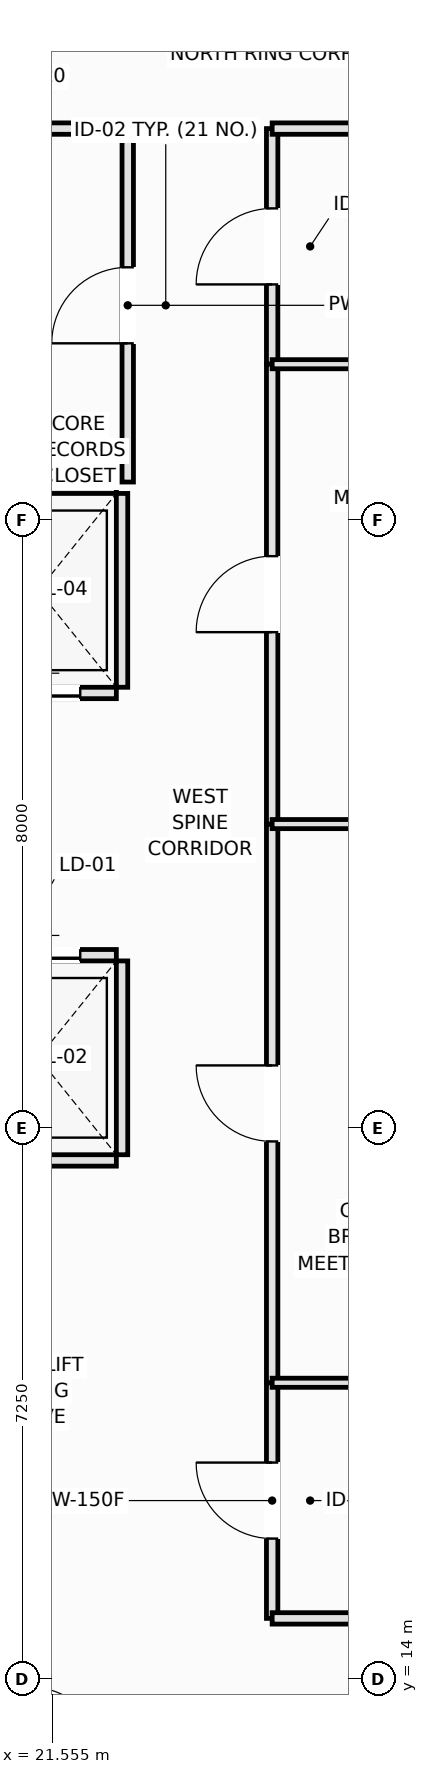
"""IFC4 building model, lengths in metres.
Left out: names, types, materials, properties, quantities, classifications, styles, units other than length and angle.
Written with IfcOpenShell. Run it as: python <this file> out.ifc"""

import sys

from ifc_helpers import new_model, si_unit, direction, frame, frame_2d, origin, place, context, subcontext, project, spatial, rectangle, extrude, element, fill, save


model = new_model("IFC4")
c1 = context("Model", 3, precision=1e-05, world=origin(), true_north=direction((0.0, 1.0)))
c2 = subcontext(c1, "Body", "Model", "MODEL_VIEW")
j1 = project(units=[si_unit("LENGTHUNIT", "METRE"), si_unit("PLANEANGLEUNIT", "RADIAN")], contexts=[c1])
p1 = place(None, origin())
s1 = spatial("IfcSite", under=j1, at=p1, CompositionType="ELEMENT")
p2 = place(p1, origin())
s2 = spatial("IfcBuilding", under=s1, at=p2, CompositionType="ELEMENT")
p3 = place(p2, frame((0.0, 0.0, 78.85)))
s3 = spatial("IfcBuildingStorey", under=s2, at=p3, CompositionType="ELEMENT", Elevation=78.85)
p4 = place(p3, frame((20.35, 20.825, 0.0), z_axis=(0.0, 0.0, 1.0), x_axis=(1.0, 0.0, 0.0)))
e1 = element("IfcWall", 1, at=p4, inside=s3, PredefinedType="PARTITIONING", context=c2, shape_type="SweptSolid", body=[
    extrude(rectangle(XDim=2.05, YDim=0.15, at=frame_2d((1.025, 0.0))), origin(), (0.0, 0.0, 1.0), 3.37),
])
p5 = place(p3, frame((20.35, 23.525, 0.0), z_axis=(0.0, 0.0, 1.0), x_axis=(1.0, 0.0, 0.0)))
e2 = element("IfcWall", 2, at=p5, inside=s3, PredefinedType="PARTITIONING", context=c2, shape_type="SweptSolid", body=[
    extrude(rectangle(XDim=2.05, YDim=0.15, at=frame_2d((1.025, 0.0))), origin(), (0.0, 0.0, 1.0), 3.37),
])
p6 = place(p5, frame((0.475, 0.0, 0.0)))
e3 = element("IfcOpeningElement", 3, at=p6, cuts=e2, PredefinedType="OPENING", context=c2, shape_type="SweptSolid", body=[
    extrude(rectangle(XDim=1.1, YDim=2.2, at=frame_2d((0.55, 1.1))), frame((0.0, 0.085, 0.0), z_axis=(0.0, -1.0, 0.0), x_axis=(1.0, 0.0, 0.0)), (0.0, 0.0, 1.0), 0.17),
])
p7 = place(p3, frame((22.475, 20.9, 0.0), z_axis=(0.0, 0.0, 1.0), x_axis=(0.0, 1.0, 0.0)))
e4 = element("IfcWall", 4, at=p7, inside=s3, PredefinedType="PARTITIONING", context=c2, shape_type="SweptSolid", body=[
    extrude(rectangle(XDim=2.55, YDim=0.15, at=frame_2d((1.275, 0.0))), origin(), (0.0, 0.0, 1.0), 3.37),
])
p8 = place(p3, frame((20.35, 26.975, 0.0), z_axis=(0.0, 0.0, 1.0), x_axis=(1.0, 0.0, 0.0)))
e5 = element("IfcWall", 5, at=p8, inside=s3, PredefinedType="PARTITIONING", context=c2, shape_type="SweptSolid", body=[
    extrude(rectangle(XDim=2.05, YDim=0.15, at=frame_2d((1.025, 0.0))), origin(), (0.0, 0.0, 1.0), 3.37),
])
p9 = place(p8, frame((0.475, 0.0, 0.0)))
e6 = element("IfcOpeningElement", 6, at=p9, cuts=e5, PredefinedType="OPENING", context=c2, shape_type="SweptSolid", body=[
    extrude(rectangle(XDim=1.1, YDim=2.2, at=frame_2d((0.55, 1.1))), frame((0.0, 0.085, 0.0), z_axis=(0.0, -1.0, 0.0), x_axis=(1.0, 0.0, 0.0)), (0.0, 0.0, 1.0), 0.17),
])
p10 = place(p3, frame((20.35, 29.675, 0.0), z_axis=(0.0, 0.0, 1.0), x_axis=(1.0, 0.0, 0.0)))
e7 = element("IfcWall", 7, at=p10, inside=s3, PredefinedType="PARTITIONING", context=c2, shape_type="SweptSolid", body=[
    extrude(rectangle(XDim=2.05, YDim=0.15, at=frame_2d((1.025, 0.0))), origin(), (0.0, 0.0, 1.0), 3.37),
])
p11 = place(p3, frame((22.475, 27.05, 0.0), z_axis=(0.0, 0.0, 1.0), x_axis=(0.0, 1.0, 0.0)))
e8 = element("IfcWall", 8, at=p11, inside=s3, PredefinedType="PARTITIONING", context=c2, shape_type="SweptSolid", body=[
    extrude(rectangle(XDim=2.55, YDim=0.15, at=frame_2d((1.275, 0.0))), origin(), (0.0, 0.0, 1.0), 3.37),
])
p12 = place(p3, frame((22.55, 29.75, 0.0), z_axis=(0.0, 0.0, 1.0), x_axis=(0.0, 1.0, 0.0)))
e9 = element("IfcWall", 9, at=p12, inside=s3, PredefinedType="PARTITIONING", context=c2, shape_type="SweptSolid", body=[
    extrude(rectangle(XDim=4.65, YDim=0.15, at=frame_2d((2.325, 0.0))), origin(), (0.0, 0.0, 1.0), 3.01),
])
p13 = place(p12, frame((1.825, 0.0, 0.0)))
e10 = element("IfcOpeningElement", 10, at=p13, cuts=e9, PredefinedType="OPENING", context=c2, shape_type="SweptSolid", body=[
    extrude(rectangle(XDim=1.0, YDim=2.15, at=frame_2d((0.5, 1.075))), frame((0.0, 0.085, 0.0), z_axis=(0.0, -1.0, 0.0), x_axis=(1.0, 0.0, 0.0)), (0.0, 0.0, 1.0), 0.17),
])
p14 = place(p3, frame((24.45, 14.8, 0.0), z_axis=(0.0, 0.0, 1.0), x_axis=(0.0, 1.0, 0.0)))
e11 = element("IfcWall", 11, at=p14, inside=s3, PredefinedType="PARTITIONING", context=c2, shape_type="SweptSolid", body=[
    extrude(rectangle(XDim=3.1, YDim=0.15, at=frame_2d((1.55, 0.0))), origin(), (0.0, 0.0, 1.0), 3.37),
])
p15 = place(p14, frame((1.05, 0.0, 0.0)))
e12 = element("IfcOpeningElement", 12, at=p15, cuts=e11, PredefinedType="OPENING", context=c2, shape_type="SweptSolid", body=[
    extrude(rectangle(XDim=1.0, YDim=2.15, at=frame_2d((0.5, 1.075))), frame((0.0, 0.085, 0.0), z_axis=(0.0, -1.0, 0.0), x_axis=(1.0, 0.0, 0.0)), (0.0, 0.0, 1.0), 0.17),
])
p16 = place(p3, frame((24.45, 31.3, 0.0), z_axis=(0.0, 0.0, 1.0), x_axis=(0.0, 1.0, 0.0)))
e13 = element("IfcWall", 13, at=p16, inside=s3, PredefinedType="PARTITIONING", context=c2, shape_type="SweptSolid", body=[
    extrude(rectangle(XDim=3.1, YDim=0.15, at=frame_2d((1.55, 0.0))), origin(), (0.0, 0.0, 1.0), 3.37),
])
p17 = place(p16, frame((1.05, 0.0, 0.0)))
e14 = element("IfcOpeningElement", 14, at=p17, cuts=e13, PredefinedType="OPENING", context=c2, shape_type="SweptSolid", body=[
    extrude(rectangle(XDim=1.0, YDim=2.15, at=frame_2d((0.5, 1.075))), frame((0.0, 0.085, 0.0), z_axis=(0.0, -1.0, 0.0), x_axis=(1.0, 0.0, 0.0)), (0.0, 0.0, 1.0), 0.17),
])
p18 = place(p3, frame((24.45, 17.9, 0.0), z_axis=(0.0, 0.0, 1.0), x_axis=(0.0, 1.0, 0.0)))
e15 = element("IfcWall", 15, at=p18, inside=s3, PredefinedType="PARTITIONING", context=c2, shape_type="SweptSolid", body=[
    extrude(rectangle(XDim=7.35, YDim=0.15, at=frame_2d((3.675, 0.0))), origin(), (0.0, 0.0, 1.0), 3.37),
])
p19 = place(p18, frame((3.175, 0.0, 0.0)))
e16 = element("IfcOpeningElement", 16, at=p19, cuts=e15, PredefinedType="OPENING", context=c2, shape_type="SweptSolid", body=[
    extrude(rectangle(XDim=1.0, YDim=2.15, at=frame_2d((0.5, 1.075))), frame((0.0, 0.085, 0.0), z_axis=(0.0, -1.0, 0.0), x_axis=(1.0, 0.0, 0.0)), (0.0, 0.0, 1.0), 0.17),
])
p20 = place(p3, frame((24.45, 25.25, 0.0), z_axis=(0.0, 0.0, 1.0), x_axis=(0.0, 1.0, 0.0)))
e17 = element("IfcWall", 17, at=p20, inside=s3, PredefinedType="PARTITIONING", context=c2, shape_type="SweptSolid", body=[
    extrude(rectangle(XDim=6.05, YDim=0.15, at=frame_2d((3.025, 0.0))), origin(), (0.0, 0.0, 1.0), 3.37),
])
p21 = place(p20, frame((2.525, 0.0, 0.0)))
e18 = element("IfcOpeningElement", 18, at=p21, cuts=e17, PredefinedType="OPENING", context=c2, shape_type="SweptSolid", body=[
    extrude(rectangle(XDim=1.0, YDim=2.15, at=frame_2d((0.5, 1.075))), frame((0.0, 0.085, 0.0), z_axis=(0.0, -1.0, 0.0), x_axis=(1.0, 0.0, 0.0)), (0.0, 0.0, 1.0), 0.17),
])
p22 = place(p3, frame((24.45, 14.8, 0.0), z_axis=(0.0, 0.0, 1.0), x_axis=(1.0, 0.0, 0.0)))
e19 = element("IfcWall", 19, at=p22, inside=s3, PredefinedType="PARTITIONING", context=c2, shape_type="SweptSolid", body=[
    extrude(rectangle(XDim=6.35, YDim=0.15, at=frame_2d((3.175, 0.0))), origin(), (0.0, 0.0, 1.0), 3.37),
])
p23 = place(p3, frame((21.25, 34.4, 0.0), z_axis=(0.0, 0.0, 1.0), x_axis=(1.0, 0.0, 0.0)))
e20 = element("IfcWall", 20, at=p23, inside=s3, PredefinedType="PARTITIONING", context=c2, shape_type="SweptSolid", body=[
    extrude(rectangle(XDim=1.3, YDim=0.15, at=frame_2d((0.65, 0.0))), origin(), (0.0, 0.0, 1.0), 3.37),
])
p24 = place(p3, frame((24.45, 34.4, 0.0), z_axis=(0.0, 0.0, 1.0), x_axis=(1.0, 0.0, 0.0)))
e21 = element("IfcWall", 21, at=p24, inside=s3, PredefinedType="PARTITIONING", context=c2, shape_type="SweptSolid", body=[
    extrude(rectangle(XDim=6.35, YDim=0.15, at=frame_2d((3.175, 0.0))), origin(), (0.0, 0.0, 1.0), 3.37),
])
for number, where, z_axis, x_axis in (
    (22, (24.45, 17.9, 0.0), (0.0, 0.0, 1.0), (1.0, 0.0, 0.0)),
    (23, (24.45, 31.3, 0.0), (0.0, 0.0, 1.0), (1.0, 0.0, 0.0)),
):
    element("IfcWall", number, at=place(p3, frame(where, z_axis=z_axis, x_axis=x_axis)), inside=s3, PredefinedType="PARTITIONING", context=c2, shape_type="SweptSolid", body=[
        extrude(rectangle(XDim=3.05, YDim=0.12, at=frame_2d((1.525, 0.0))), origin(), (0.0, 0.0, 1.0), 3.37),
    ])
p25 = place(p3, frame((24.45, 25.25, 0.0), z_axis=(0.0, 0.0, 1.0), x_axis=(1.0, 0.0, 0.0)))
e24 = element("IfcWall", 24, at=p25, inside=s3, PredefinedType="PARTITIONING", context=c2, shape_type="SweptSolid", body=[
    extrude(rectangle(XDim=3.05, YDim=0.12, at=frame_2d((1.525, 0.0))), origin(), (0.0, 0.0, 1.0), 2.72),
])
p26 = place(p6, origin())
e25 = element("IfcDoor", 25, at=p26, inside=s3, OperationType="DOUBLE_DOOR_SLIDING", PredefinedType="DOOR", context=c2, shape_type="SweptSolid", body=[
    extrude(rectangle(XDim=1.1, YDim=2.2, at=frame_2d((0.55, 1.1))), frame((0.0, 0.025, 0.0), z_axis=(0.0, -1.0, 0.0), x_axis=(1.0, 0.0, 0.0)), (0.0, 0.0, 1.0), 0.05),
])
fill(e3, e25)
p27 = place(p9, origin())
e26 = element("IfcDoor", 26, at=p27, inside=s3, OperationType="DOUBLE_DOOR_SLIDING", PredefinedType="DOOR", context=c2, shape_type="SweptSolid", body=[
    extrude(rectangle(XDim=1.1, YDim=2.2, at=frame_2d((0.55, 1.1))), frame((0.0, 0.025, 0.0), z_axis=(0.0, -1.0, 0.0), x_axis=(1.0, 0.0, 0.0)), (0.0, 0.0, 1.0), 0.05),
])
fill(e6, e26)
p28 = place(p13, origin())
e27 = element("IfcDoor", 27, at=p28, inside=s3, OperationType="SINGLE_SWING_LEFT", PredefinedType="DOOR", context=c2, shape_type="SweptSolid", body=[
    extrude(rectangle(XDim=1.0, YDim=2.15, at=frame_2d((0.5, 1.075))), frame((0.0, 0.025, 0.0), z_axis=(0.0, -1.0, 0.0), x_axis=(1.0, 0.0, 0.0)), (0.0, 0.0, 1.0), 0.05),
])
fill(e10, e27)
p29 = place(p15, origin())
e28 = element("IfcDoor", 28, at=p29, inside=s3, OperationType="SINGLE_SWING_RIGHT", PredefinedType="DOOR", context=c2, shape_type="SweptSolid", body=[
    extrude(rectangle(XDim=1.0, YDim=2.15, at=frame_2d((0.5, 1.075))), frame((0.0, 0.025, 0.0), z_axis=(0.0, -1.0, 0.0), x_axis=(1.0, 0.0, 0.0)), (0.0, 0.0, 1.0), 0.05),
])
fill(e12, e28)
p30 = place(p17, origin())
e29 = element("IfcDoor", 29, at=p30, inside=s3, OperationType="SINGLE_SWING_LEFT", PredefinedType="DOOR", context=c2, shape_type="SweptSolid", body=[
    extrude(rectangle(XDim=1.0, YDim=2.15, at=frame_2d((0.5, 1.075))), frame((0.0, 0.025, 0.0), z_axis=(0.0, -1.0, 0.0), x_axis=(1.0, 0.0, 0.0)), (0.0, 0.0, 1.0), 0.05),
])
fill(e14, e29)
p31 = place(p19, origin())
e30 = element("IfcDoor", 30, at=p31, inside=s3, OperationType="SINGLE_SWING_RIGHT", PredefinedType="DOOR", context=c2, shape_type="SweptSolid", body=[
    extrude(rectangle(XDim=1.0, YDim=2.15, at=frame_2d((0.5, 1.075))), frame((0.0, 0.025, 0.0), z_axis=(0.0, -1.0, 0.0), x_axis=(1.0, 0.0, 0.0)), (0.0, 0.0, 1.0), 0.05),
])
fill(e16, e30)
p32 = place(p21, origin())
e31 = element("IfcDoor", 31, at=p32, inside=s3, OperationType="SINGLE_SWING_LEFT", PredefinedType="DOOR", context=c2, shape_type="SweptSolid", body=[
    extrude(rectangle(XDim=1.0, YDim=2.15, at=frame_2d((0.5, 1.075))), frame((0.0, 0.025, 0.0), z_axis=(0.0, -1.0, 0.0), x_axis=(1.0, 0.0, 0.0)), (0.0, 0.0, 1.0), 0.05),
])
fill(e18, e31)
save(model, sys.argv[1])
